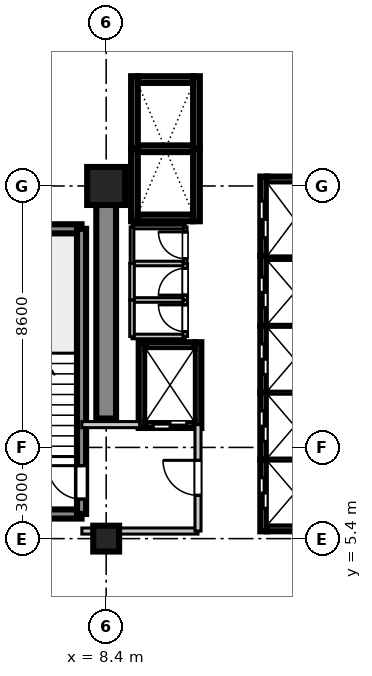
"""IFC4 building model, lengths in metres.
Left out: names, types, materials, properties, quantities, classifications, styles, units other than length and angle.
Written with IfcOpenShell. Run it as: python <this file> out.ifc"""

import sys

from ifc_helpers import new_model, si_unit, direction, frame, frame_2d, origin, origin_2d, place, context, subcontext, project, spatial, rectangle, extrude, source, transform, mapped, element, fill, save


model = new_model("IFC4")
c1 = context("Model", 3, precision=1e-05, world=origin(), true_north=direction((0.0, 1.0)))
c2 = subcontext(c1, "Body", "Model", "MODEL_VIEW")
j1 = project(units=[si_unit("LENGTHUNIT", "METRE"), si_unit("PLANEANGLEUNIT", "RADIAN")], contexts=[c1])
p1 = place(None, origin())
s1 = spatial("IfcSite", under=j1, at=p1, CompositionType="ELEMENT")
p2 = place(p1, origin())
s2 = spatial("IfcBuilding", under=s1, at=p2, CompositionType="ELEMENT")
p3 = place(p2, frame((0.0, 0.0, 132.1)))
s3 = spatial("IfcBuildingStorey", under=s2, at=p3, CompositionType="ELEMENT", Elevation=132.1)
m1 = source(origin(), c2, "Body", "SweptSolid", [
    extrude(rectangle(XDim=0.85, YDim=0.85, at=origin_2d()), origin(), (0.0, 0.0, 1.0), 3.605),
])
p4 = place(p3, frame((8.4, 5.4, 0.0), z_axis=(0.0, 0.0, 1.0), x_axis=(1.0, 0.0, 0.0)))
e1 = element("IfcColumn", 1, at=p4, inside=s3, PredefinedType="PILASTER", context=c2, shape_type="MappedRepresentation", body=[
    mapped(m1, transform((0.0, 0.0, 0.0), scale=1.0)),
])
m2 = source(origin(), c2, "Body", "SweptSolid", [
    extrude(rectangle(XDim=1.25, YDim=1.25, at=origin_2d()), origin(), (0.0, 0.0, 1.0), 3.605),
])
p5 = place(p3, frame((8.4, 17.0, 0.0), z_axis=(0.0, 0.0, 1.0), x_axis=(1.0, 0.0, 0.0)))
e2 = element("IfcColumn", 2, at=p5, inside=s3, PredefinedType="COLUMN", context=c2, shape_type="MappedRepresentation", body=[
    mapped(m2, transform((0.0, 0.0, 0.0), scale=1.0)),
])
m3 = source(origin(), c2, "Body", "SweptSolid", [
    extrude(rectangle(XDim=7.65, YDim=0.65, at=frame_2d((3.825, 0.0))), origin(), (0.0, 0.0, 1.0), 3.38),
])
p6 = place(p3, frame((8.4, 9.35, 0.0), z_axis=(0.0, 0.0, 1.0), x_axis=(0.0, 1.0, 0.0)))
e3 = element("IfcWall", 3, at=p6, inside=s3, PredefinedType="SHEAR", context=c2, shape_type="MappedRepresentation", body=[
    mapped(m3, transform((0.0, 0.0, 0.0), scale=1.0)),
])
m4 = source(origin(), c2, "Body", "SweptSolid", [
    extrude(rectangle(XDim=3.98, YDim=0.3, at=frame_2d((1.99, 0.0))), origin(), (0.0, 0.0, 1.0), 3.38),
])
for number, where, z_axis, x_axis in (
    (4, (3.61, 6.21, 0.0), (0.0, 0.0, 1.0), (1.0, 0.0, 0.0)),
    (5, (3.61, 15.59, 0.0), (0.0, 0.0, 1.0), (1.0, 0.0, 0.0)),
):
    element("IfcWall", number, at=place(p3, frame(where, z_axis=z_axis, x_axis=x_axis)), inside=s3, PredefinedType="SHEAR", context=c2, shape_type="MappedRepresentation", body=[
        mapped(m4, transform((0.0, 0.0, 0.0), scale=1.0)),
    ])
m5 = source(origin(), c2, "Body", "SweptSolid", [
    extrude(rectangle(XDim=9.38, YDim=0.3, at=frame_2d((4.69, 0.0))), origin(), (0.0, 0.0, 1.0), 3.38),
])
p7 = place(p3, frame((7.59, 6.21, 0.0), z_axis=(0.0, 0.0, 1.0), x_axis=(0.0, 1.0, 0.0)))
e6 = element("IfcWall", 6, at=p7, inside=s3, PredefinedType="SHEAR", context=c2, shape_type="MappedRepresentation", body=[
    mapped(m5, transform((0.0, 0.0, 0.0), scale=1.0)),
])
p8 = place(p7, frame((0.49, 0.0, 0.0)))
e7 = element("IfcOpeningElement", 7, at=p8, cuts=e6, PredefinedType="OPENING", context=c2, shape_type="SweptSolid", body=[
    extrude(rectangle(XDim=1.1, YDim=2.15, at=frame_2d((0.55, 1.075))), frame((0.0, 0.16, 0.0), z_axis=(0.0, -1.0, 0.0), x_axis=(1.0, 0.0, 0.0)), (0.0, 0.0, 1.0), 0.32),
])
m6 = source(origin(), c2, "Body", "SweptSolid", [
    extrude(rectangle(XDim=2.36, YDim=0.22, at=frame_2d((1.18, 0.0))), origin(), (0.0, 0.0, 1.0), 3.38),
])
p9 = place(p3, frame((13.58, 5.64, 0.0), z_axis=(0.0, 0.0, 1.0), x_axis=(0.0, 1.0, 0.0)))
e8 = element("IfcWall", 8, at=p9, inside=s3, PredefinedType="SHEAR", context=c2, shape_type="MappedRepresentation", body=[
    mapped(m6, transform((0.0, 0.0, 0.0), scale=1.0)),
])
p10 = place(p9, frame((0.76, 0.0, 0.0)))
e9 = element("IfcOpeningElement", 9, at=p10, cuts=e8, PredefinedType="OPENING", context=c2, shape_type="SweptSolid", body=[
    extrude(rectangle(XDim=1.0, YDim=2.2, at=frame_2d((0.5, 1.1))), frame((0.0, 0.12, 0.0), z_axis=(0.0, -1.0, 0.0), x_axis=(1.0, 0.0, 0.0)), (0.0, 0.0, 1.0), 0.24),
])
m7 = source(origin(), c2, "Body", "SweptSolid", [
    extrude(rectangle(XDim=1.82, YDim=0.22, at=frame_2d((0.91, 0.0))), origin(), (0.0, 0.0, 1.0), 3.38),
])
p11 = place(p3, frame((13.69, 5.75, 0.0), z_axis=(0.0, 0.0, 1.0), x_axis=(1.0, 0.0, 0.0)))
e10 = element("IfcWall", 10, at=p11, inside=s3, PredefinedType="SHEAR", context=c2, shape_type="MappedRepresentation", body=[
    mapped(m7, transform((0.0, 0.0, 0.0), scale=1.0)),
])
m8 = source(origin(), c2, "Body", "SweptSolid", [
    extrude(rectangle(XDim=1.82, YDim=0.22, at=frame_2d((0.91, 0.0))), origin(), (0.0, 0.0, 1.0), 3.65),
])
p12 = place(p3, frame((13.69, 8.0, 0.0), z_axis=(0.0, 0.0, 1.0), x_axis=(1.0, 0.0, 0.0)))
e11 = element("IfcWall", 11, at=p12, inside=s3, PredefinedType="SHEAR", context=c2, shape_type="MappedRepresentation", body=[
    mapped(m8, transform((0.0, 0.0, 0.0), scale=1.0)),
])
m9 = source(origin(), c2, "Body", "SweptSolid", [
    extrude(rectangle(XDim=2.2, YDim=0.22, at=frame_2d((1.1, 0.0))), origin(), (0.0, 0.0, 1.0), 3.38),
])
p13 = place(p3, frame((13.58, 8.0, 0.0), z_axis=(0.0, 0.0, 1.0), x_axis=(0.0, 1.0, 0.0)))
e12 = element("IfcWall", 12, at=p13, inside=s3, PredefinedType="SHEAR", context=c2, shape_type="MappedRepresentation", body=[
    mapped(m9, transform((0.0, 0.0, 0.0), scale=1.0)),
])
p14 = place(p13, frame((0.6, 0.0, 0.0)))
e13 = element("IfcOpeningElement", 13, at=p14, cuts=e12, PredefinedType="OPENING", context=c2, shape_type="SweptSolid", body=[
    extrude(rectangle(XDim=1.0, YDim=2.2, at=frame_2d((0.5, 1.1))), frame((0.0, 0.12, 0.0), z_axis=(0.0, -1.0, 0.0), x_axis=(1.0, 0.0, 0.0)), (0.0, 0.0, 1.0), 0.24),
])
p15 = place(p3, frame((13.69, 10.2, 0.0), z_axis=(0.0, 0.0, 1.0), x_axis=(1.0, 0.0, 0.0)))
e14 = element("IfcWall", 14, at=p15, inside=s3, PredefinedType="SHEAR", context=c2, shape_type="MappedRepresentation", body=[
    mapped(m8, transform((0.0, 0.0, 0.0), scale=1.0)),
])
p16 = place(p3, frame((13.58, 10.2, 0.0), z_axis=(0.0, 0.0, 1.0), x_axis=(0.0, 1.0, 0.0)))
e15 = element("IfcWall", 15, at=p16, inside=s3, PredefinedType="SHEAR", context=c2, shape_type="MappedRepresentation", body=[
    mapped(m9, transform((0.0, 0.0, 0.0), scale=1.0)),
])
p17 = place(p16, frame((0.6, 0.0, 0.0)))
e16 = element("IfcOpeningElement", 16, at=p17, cuts=e15, PredefinedType="OPENING", context=c2, shape_type="SweptSolid", body=[
    extrude(rectangle(XDim=1.0, YDim=2.2, at=frame_2d((0.5, 1.1))), frame((0.0, 0.12, 0.0), z_axis=(0.0, -1.0, 0.0), x_axis=(1.0, 0.0, 0.0)), (0.0, 0.0, 1.0), 0.24),
])
p18 = place(p3, frame((13.69, 12.4, 0.0), z_axis=(0.0, 0.0, 1.0), x_axis=(1.0, 0.0, 0.0)))
e17 = element("IfcWall", 17, at=p18, inside=s3, PredefinedType="SHEAR", context=c2, shape_type="MappedRepresentation", body=[
    mapped(m8, transform((0.0, 0.0, 0.0), scale=1.0)),
])
m10 = source(origin(), c2, "Body", "SweptSolid", [
    extrude(rectangle(XDim=2.3, YDim=0.22, at=frame_2d((1.15, 0.0))), origin(), (0.0, 0.0, 1.0), 3.38),
])
p19 = place(p3, frame((13.58, 12.4, 0.0), z_axis=(0.0, 0.0, 1.0), x_axis=(0.0, 1.0, 0.0)))
e18 = element("IfcWall", 18, at=p19, inside=s3, PredefinedType="SHEAR", context=c2, shape_type="MappedRepresentation", body=[
    mapped(m10, transform((0.0, 0.0, 0.0), scale=1.0)),
])
p20 = place(p19, frame((0.6, 0.0, 0.0)))
e19 = element("IfcOpeningElement", 19, at=p20, cuts=e18, PredefinedType="OPENING", context=c2, shape_type="SweptSolid", body=[
    extrude(rectangle(XDim=1.0, YDim=2.2, at=frame_2d((0.5, 1.1))), frame((0.0, 0.12, 0.0), z_axis=(0.0, -1.0, 0.0), x_axis=(1.0, 0.0, 0.0)), (0.0, 0.0, 1.0), 0.24),
])
p21 = place(p3, frame((13.69, 14.7, 0.0), z_axis=(0.0, 0.0, 1.0), x_axis=(1.0, 0.0, 0.0)))
e20 = element("IfcWall", 20, at=p21, inside=s3, PredefinedType="SHEAR", context=c2, shape_type="MappedRepresentation", body=[
    mapped(m8, transform((0.0, 0.0, 0.0), scale=1.0)),
])
m11 = source(origin(), c2, "Body", "SweptSolid", [
    extrude(rectangle(XDim=2.385, YDim=0.22, at=frame_2d((1.192, 0.0))), origin(), (0.0, 0.0, 1.0), 3.38),
])
for number, where, z_axis, x_axis in (
    (21, (9.33, 15.84, 0.0), (0.0, 0.0, 1.0), (0.0, 1.0, 0.0)),
    (22, (11.37, 15.84, 0.0), (0.0, 0.0, 1.0), (0.0, 1.0, 0.0)),
):
    element("IfcWall", number, at=place(p3, frame(where, z_axis=z_axis, x_axis=x_axis)), inside=s3, PredefinedType="SHEAR", context=c2, shape_type="MappedRepresentation", body=[
        mapped(m11, transform((0.0, 0.0, 0.0), scale=1.0)),
    ])
p22 = place(p3, frame((9.44, 15.95, 0.0), z_axis=(0.0, 0.0, 1.0), x_axis=(1.0, 0.0, 0.0)))
e23 = element("IfcWall", 23, at=p22, inside=s3, PredefinedType="SHEAR", context=c2, shape_type="MappedRepresentation", body=[
    mapped(m7, transform((0.0, 0.0, 0.0), scale=1.0)),
])
p23 = place(p3, frame((9.44, 18.225, 0.0), z_axis=(0.0, 0.0, 1.0), x_axis=(1.0, 0.0, 0.0)))
e24 = element("IfcWall", 24, at=p23, inside=s3, PredefinedType="SHEAR", context=c2, shape_type="MappedRepresentation", body=[
    mapped(m8, transform((0.0, 0.0, 0.0), scale=1.0)),
])
for number, where, z_axis, x_axis in (
    (25, (9.33, 18.225, 0.0), (0.0, 0.0, 1.0), (0.0, 1.0, 0.0)),
    (26, (11.37, 18.225, 0.0), (0.0, 0.0, 1.0), (0.0, 1.0, 0.0)),
):
    element("IfcWall", number, at=place(p3, frame(where, z_axis=z_axis, x_axis=x_axis)), inside=s3, PredefinedType="SHEAR", context=c2, shape_type="MappedRepresentation", body=[
        mapped(m11, transform((0.0, 0.0, 0.0), scale=1.0)),
    ])
p24 = place(p3, frame((9.44, 20.5, 0.0), z_axis=(0.0, 0.0, 1.0), x_axis=(1.0, 0.0, 0.0)))
e27 = element("IfcWall", 27, at=p24, inside=s3, PredefinedType="SHEAR", context=c2, shape_type="MappedRepresentation", body=[
    mapped(m7, transform((0.0, 0.0, 0.0), scale=1.0)),
])
m12 = source(origin(), c2, "Body", "SweptSolid", [
    extrude(rectangle(XDim=2.82, YDim=0.22, at=frame_2d((1.41, 0.0))), origin(), (0.0, 0.0, 1.0), 3.38),
])
for number, where, z_axis, x_axis in (
    (28, (9.58, 9.04, 0.0), (0.0, 0.0, 1.0), (0.0, 1.0, 0.0)),
    (29, (11.42, 9.04, 0.0), (0.0, 0.0, 1.0), (0.0, 1.0, 0.0)),
):
    element("IfcWall", number, at=place(p3, frame(where, z_axis=z_axis, x_axis=x_axis)), inside=s3, PredefinedType="SHEAR", context=c2, shape_type="MappedRepresentation", body=[
        mapped(m12, transform((0.0, 0.0, 0.0), scale=1.0)),
    ])
m13 = source(origin(), c2, "Body", "SweptSolid", [
    extrude(rectangle(XDim=1.62, YDim=0.22, at=frame_2d((0.81, 0.0))), origin(), (0.0, 0.0, 1.0), 3.38),
])
p25 = place(p3, frame((9.69, 9.15, 0.0), z_axis=(0.0, 0.0, 1.0), x_axis=(1.0, 0.0, 0.0)))
e30 = element("IfcWall", 30, at=p25, inside=s3, PredefinedType="SHEAR", context=c2, shape_type="MappedRepresentation", body=[
    mapped(m13, transform((0.0, 0.0, 0.0), scale=1.0)),
])
p26 = place(p25, frame((0.26, 0.0, 0.0)))
e31 = element("IfcOpeningElement", 31, at=p26, cuts=e30, PredefinedType="OPENING", context=c2, shape_type="SweptSolid", body=[
    extrude(rectangle(XDim=1.1, YDim=2.2, at=frame_2d((0.55, 1.1))), frame((0.0, 0.12, 0.0), z_axis=(0.0, -1.0, 0.0), x_axis=(1.0, 0.0, 0.0)), (0.0, 0.0, 1.0), 0.24),
])
p27 = place(p3, frame((9.69, 11.75, 0.0), z_axis=(0.0, 0.0, 1.0), x_axis=(1.0, 0.0, 0.0)))
e32 = element("IfcWall", 32, at=p27, inside=s3, PredefinedType="SHEAR", context=c2, shape_type="MappedRepresentation", body=[
    mapped(m13, transform((0.0, 0.0, 0.0), scale=1.0)),
])
m14 = source(origin(), c2, "Body", "SweptSolid", [
    extrude(rectangle(XDim=2.61, YDim=0.22, at=frame_2d((1.305, 0.0))), origin(), (0.0, 0.0, 1.0), 3.38),
])
p28 = place(p3, frame((13.58, 14.7, 0.0), z_axis=(0.0, 0.0, 1.0), x_axis=(0.0, 1.0, 0.0)))
e33 = element("IfcWall", 33, at=p28, inside=s3, PredefinedType="SHEAR", context=c2, shape_type="MappedRepresentation", body=[
    mapped(m14, transform((0.0, 0.0, 0.0), scale=1.0)),
])
p29 = place(p28, frame((0.6, 0.0, 0.0)))
e34 = element("IfcOpeningElement", 34, at=p29, cuts=e33, PredefinedType="OPENING", context=c2, shape_type="SweptSolid", body=[
    extrude(rectangle(XDim=1.2, YDim=2.2, at=frame_2d((0.6, 1.1))), frame((0.0, 0.12, 0.0), z_axis=(0.0, -1.0, 0.0), x_axis=(1.0, 0.0, 0.0)), (0.0, 0.0, 1.0), 0.24),
])
p30 = place(p3, frame((13.69, 17.2, 0.0), z_axis=(0.0, 0.0, 1.0), x_axis=(1.0, 0.0, 0.0)))
e35 = element("IfcWall", 35, at=p30, inside=s3, PredefinedType="SHEAR", context=c2, shape_type="MappedRepresentation", body=[
    mapped(m7, transform((0.0, 0.0, 0.0), scale=1.0)),
])
m15 = source(origin(), c2, "Body", "SweptSolid", [
    extrude(rectangle(XDim=3.82, YDim=0.2, at=frame_2d((1.91, 0.0))), origin(), (0.0, 0.0, 1.0), 2.72),
])
p31 = place(p3, frame((7.6, 5.65, 0.0), z_axis=(0.0, 0.0, 1.0), x_axis=(1.0, 0.0, 0.0)))
e36 = element("IfcWall", 36, at=p31, inside=s3, PredefinedType="PARTITIONING", context=c2, shape_type="MappedRepresentation", body=[
    mapped(m15, transform((0.0, 0.0, 0.0), scale=1.0)),
])
m16 = source(origin(), c2, "Body", "SweptSolid", [
    extrude(rectangle(XDim=1.9, YDim=0.2, at=frame_2d((0.95, 0.0))), origin(), (0.0, 0.0, 1.0), 2.72),
])
p32 = place(p3, frame((7.6, 9.15, 0.0), z_axis=(0.0, 0.0, 1.0), x_axis=(1.0, 0.0, 0.0)))
e37 = element("IfcWall", 37, at=p32, inside=s3, PredefinedType="PARTITIONING", context=c2, shape_type="MappedRepresentation", body=[
    mapped(m16, transform((0.0, 0.0, 0.0), scale=1.0)),
])
m17 = source(origin(), c2, "Body", "SweptSolid", [
    extrude(rectangle(XDim=3.5, YDim=0.2, at=frame_2d((1.75, 0.0))), origin(), (0.0, 0.0, 1.0), 2.72),
])
p33 = place(p3, frame((11.42, 5.65, 0.0), z_axis=(0.0, 0.0, 1.0), x_axis=(0.0, 1.0, 0.0)))
e38 = element("IfcWall", 38, at=p33, inside=s3, PredefinedType="PARTITIONING", context=c2, shape_type="MappedRepresentation", body=[
    mapped(m17, transform((0.0, 0.0, 0.0), scale=1.0)),
])
p34 = place(p33, frame((1.175, 0.0, 0.0)))
e39 = element("IfcOpeningElement", 39, at=p34, cuts=e38, PredefinedType="OPENING", context=c2, shape_type="SweptSolid", body=[
    extrude(rectangle(XDim=1.15, YDim=2.15, at=frame_2d((0.575, 1.075))), frame((0.0, 0.11, 0.0), z_axis=(0.0, -1.0, 0.0), x_axis=(1.0, 0.0, 0.0)), (0.0, 0.0, 1.0), 0.22),
])
m18 = source(origin(), c2, "Body", "SweptSolid", [
    extrude(rectangle(XDim=1.75, YDim=0.15, at=frame_2d((0.875, 0.0))), origin(), (0.0, 0.0, 1.0), 2.72),
])
for number, where, z_axis, x_axis in (
    (40, (9.25, 12.05, 0.0), (0.0, 0.0, 1.0), (1.0, 0.0, 0.0)),
    (41, (9.25, 13.25, 0.0), (0.0, 0.0, 1.0), (1.0, 0.0, 0.0)),
):
    element("IfcWall", number, at=place(p3, frame(where, z_axis=z_axis, x_axis=x_axis)), inside=s3, PredefinedType="PARTITIONING", context=c2, shape_type="MappedRepresentation", body=[
        mapped(m18, transform((0.0, 0.0, 0.0), scale=1.0)),
    ])
m19 = source(origin(), c2, "Body", "SweptSolid", [
    extrude(rectangle(XDim=1.2, YDim=0.15, at=frame_2d((0.6, 0.0))), origin(), (0.0, 0.0, 1.0), 2.72),
])
p35 = place(p3, frame((9.25, 12.05, 0.0), z_axis=(0.0, 0.0, 1.0), x_axis=(0.0, 1.0, 0.0)))
e42 = element("IfcWall", 42, at=p35, inside=s3, PredefinedType="PARTITIONING", context=c2, shape_type="MappedRepresentation", body=[
    mapped(m19, transform((0.0, 0.0, 0.0), scale=1.0)),
])
p36 = place(p3, frame((11.0, 12.05, 0.0), z_axis=(0.0, 0.0, 1.0), x_axis=(0.0, 1.0, 0.0)))
e43 = element("IfcWall", 43, at=p36, inside=s3, PredefinedType="PARTITIONING", context=c2, shape_type="MappedRepresentation", body=[
    mapped(m19, transform((0.0, 0.0, 0.0), scale=1.0)),
])
p37 = place(p36, frame((0.16, 0.0, 0.0)))
e44 = element("IfcOpeningElement", 44, at=p37, cuts=e43, PredefinedType="OPENING", context=c2, shape_type="SweptSolid", body=[
    extrude(rectangle(XDim=0.88, YDim=2.1, at=frame_2d((0.44, 1.05))), frame((0.0, 0.085, 0.0), z_axis=(0.0, -1.0, 0.0), x_axis=(1.0, 0.0, 0.0)), (0.0, 0.0, 1.0), 0.17),
])
p38 = place(p3, frame((9.25, 14.45, 0.0), z_axis=(0.0, 0.0, 1.0), x_axis=(1.0, 0.0, 0.0)))
e45 = element("IfcWall", 45, at=p38, inside=s3, PredefinedType="PARTITIONING", context=c2, shape_type="MappedRepresentation", body=[
    mapped(m18, transform((0.0, 0.0, 0.0), scale=1.0)),
])
p39 = place(p3, frame((9.25, 13.25, 0.0), z_axis=(0.0, 0.0, 1.0), x_axis=(0.0, 1.0, 0.0)))
e46 = element("IfcWall", 46, at=p39, inside=s3, PredefinedType="PARTITIONING", context=c2, shape_type="MappedRepresentation", body=[
    mapped(m19, transform((0.0, 0.0, 0.0), scale=1.0)),
])
p40 = place(p3, frame((11.0, 13.25, 0.0), z_axis=(0.0, 0.0, 1.0), x_axis=(0.0, 1.0, 0.0)))
e47 = element("IfcWall", 47, at=p40, inside=s3, PredefinedType="PARTITIONING", context=c2, shape_type="MappedRepresentation", body=[
    mapped(m19, transform((0.0, 0.0, 0.0), scale=1.0)),
])
p41 = place(p40, frame((0.16, 0.0, 0.0)))
e48 = element("IfcOpeningElement", 48, at=p41, cuts=e47, PredefinedType="OPENING", context=c2, shape_type="SweptSolid", body=[
    extrude(rectangle(XDim=0.88, YDim=2.1, at=frame_2d((0.44, 1.05))), frame((0.0, 0.085, 0.0), z_axis=(0.0, -1.0, 0.0), x_axis=(1.0, 0.0, 0.0)), (0.0, 0.0, 1.0), 0.17),
])
m20 = source(origin(), c2, "Body", "SweptSolid", [
    extrude(rectangle(XDim=1.75, YDim=0.12, at=frame_2d((0.875, 0.0))), origin(), (0.0, 0.0, 1.0), 2.72),
])
p42 = place(p3, frame((9.25, 15.65, 0.0), z_axis=(0.0, 0.0, 1.0), x_axis=(1.0, 0.0, 0.0)))
e49 = element("IfcWall", 49, at=p42, inside=s3, PredefinedType="PARTITIONING", context=c2, shape_type="MappedRepresentation", body=[
    mapped(m20, transform((0.0, 0.0, 0.0), scale=1.0)),
])
m21 = source(origin(), c2, "Body", "SweptSolid", [
    extrude(rectangle(XDim=1.2, YDim=0.12, at=frame_2d((0.6, 0.0))), origin(), (0.0, 0.0, 1.0), 2.72),
])
p43 = place(p3, frame((9.25, 14.45, 0.0), z_axis=(0.0, 0.0, 1.0), x_axis=(0.0, 1.0, 0.0)))
e50 = element("IfcWall", 50, at=p43, inside=s3, PredefinedType="PARTITIONING", context=c2, shape_type="MappedRepresentation", body=[
    mapped(m21, transform((0.0, 0.0, 0.0), scale=1.0)),
])
p44 = place(p3, frame((11.0, 14.45, 0.0), z_axis=(0.0, 0.0, 1.0), x_axis=(0.0, 1.0, 0.0)))
e51 = element("IfcWall", 51, at=p44, inside=s3, PredefinedType="PARTITIONING", context=c2, shape_type="MappedRepresentation", body=[
    mapped(m21, transform((0.0, 0.0, 0.0), scale=1.0)),
])
p45 = place(p44, frame((0.16, 0.0, 0.0)))
e52 = element("IfcOpeningElement", 52, at=p45, cuts=e51, PredefinedType="OPENING", context=c2, shape_type="SweptSolid", body=[
    extrude(rectangle(XDim=0.88, YDim=2.1, at=frame_2d((0.44, 1.05))), frame((0.0, 0.07, 0.0), z_axis=(0.0, -1.0, 0.0), x_axis=(1.0, 0.0, 0.0)), (0.0, 0.0, 1.0), 0.14),
])
m22 = source(origin(), c2, "Body", "SweptSolid", [
    extrude(rectangle(XDim=1.1, YDim=2.15, at=frame_2d((0.55, 1.075))), frame((0.0, 0.025, 0.0), z_axis=(0.0, -1.0, 0.0), x_axis=(1.0, 0.0, 0.0)), (0.0, 0.0, 1.0), 0.05),
])
p46 = place(p8, origin())
e53 = element("IfcDoor", 53, at=p46, inside=s3, OperationType="SINGLE_SWING_RIGHT", PredefinedType="DOOR", context=c2, shape_type="MappedRepresentation", body=[
    mapped(m22, transform((0.0, 0.0, 0.0), scale=1.0)),
])
fill(e7, e53)
m23 = source(origin(), c2, "Body", "SweptSolid", [
    extrude(rectangle(XDim=1.0, YDim=2.2, at=frame_2d((0.5, 1.1))), frame((0.0, 0.025, 0.0), z_axis=(0.0, -1.0, 0.0), x_axis=(1.0, 0.0, 0.0)), (0.0, 0.0, 1.0), 0.05),
])
p47 = place(p10, origin())
e54 = element("IfcDoor", 54, at=p47, inside=s3, OperationType="DOUBLE_DOOR_SLIDING", PredefinedType="DOOR", context=c2, shape_type="MappedRepresentation", body=[
    mapped(m23, transform((0.0, 0.0, 0.0), scale=1.0)),
])
fill(e9, e54)
p48 = place(p14, origin())
e55 = element("IfcDoor", 55, at=p48, inside=s3, OperationType="DOUBLE_DOOR_SLIDING", PredefinedType="DOOR", context=c2, shape_type="MappedRepresentation", body=[
    mapped(m23, transform((0.0, 0.0, 0.0), scale=1.0)),
])
fill(e13, e55)
p49 = place(p17, origin())
e56 = element("IfcDoor", 56, at=p49, inside=s3, OperationType="DOUBLE_DOOR_SLIDING", PredefinedType="DOOR", context=c2, shape_type="MappedRepresentation", body=[
    mapped(m23, transform((0.0, 0.0, 0.0), scale=1.0)),
])
fill(e16, e56)
p50 = place(p20, origin())
e57 = element("IfcDoor", 57, at=p50, inside=s3, OperationType="DOUBLE_DOOR_SLIDING", PredefinedType="DOOR", context=c2, shape_type="MappedRepresentation", body=[
    mapped(m23, transform((0.0, 0.0, 0.0), scale=1.0)),
])
fill(e19, e57)
m24 = source(origin(), c2, "Body", "SweptSolid", [
    extrude(rectangle(XDim=1.1, YDim=2.2, at=frame_2d((0.55, 1.1))), frame((0.0, 0.025, 0.0), z_axis=(0.0, -1.0, 0.0), x_axis=(1.0, 0.0, 0.0)), (0.0, 0.0, 1.0), 0.05),
])
p51 = place(p26, frame((1.1, 0.0, 0.0), z_axis=(0.0, 0.0, 1.0), x_axis=(-1.0, 0.0, 0.0)))
e58 = element("IfcDoor", 58, at=p51, inside=s3, OperationType="DOUBLE_DOOR_SLIDING", PredefinedType="DOOR", context=c2, shape_type="MappedRepresentation", body=[
    mapped(m24, transform((0.0, 0.0, 0.0), scale=1.0)),
])
fill(e31, e58)
m25 = source(origin(), c2, "Body", "SweptSolid", [
    extrude(rectangle(XDim=1.2, YDim=2.2, at=frame_2d((0.6, 1.1))), frame((0.0, 0.025, 0.0), z_axis=(0.0, -1.0, 0.0), x_axis=(1.0, 0.0, 0.0)), (0.0, 0.0, 1.0), 0.05),
])
p52 = place(p29, origin())
e59 = element("IfcDoor", 59, at=p52, inside=s3, OperationType="DOUBLE_DOOR_SLIDING", PredefinedType="DOOR", context=c2, shape_type="MappedRepresentation", body=[
    mapped(m25, transform((0.0, 0.0, 0.0), scale=1.0)),
])
fill(e34, e59)
m26 = source(origin(), c2, "Body", "SweptSolid", [
    extrude(rectangle(XDim=1.15, YDim=2.15, at=frame_2d((0.575, 1.075))), frame((0.0, 0.025, 0.0), z_axis=(0.0, -1.0, 0.0), x_axis=(1.0, 0.0, 0.0)), (0.0, 0.0, 1.0), 0.05),
])
p53 = place(p34, frame((1.15, 0.0, 0.0), z_axis=(0.0, 0.0, 1.0), x_axis=(-1.0, 0.0, 0.0)))
e60 = element("IfcDoor", 60, at=p53, inside=s3, OperationType="SINGLE_SWING_RIGHT", PredefinedType="DOOR", context=c2, shape_type="MappedRepresentation", body=[
    mapped(m26, transform((0.0, 0.0, 0.0), scale=1.0)),
])
fill(e39, e60)
m27 = source(origin(), c2, "Body", "SweptSolid", [
    extrude(rectangle(XDim=0.88, YDim=2.1, at=frame_2d((0.44, 1.05))), frame((0.0, 0.025, 0.0), z_axis=(0.0, -1.0, 0.0), x_axis=(1.0, 0.0, 0.0)), (0.0, 0.0, 1.0), 0.05),
])
p54 = place(p37, origin())
e61 = element("IfcDoor", 61, at=p54, inside=s3, OperationType="SINGLE_SWING_RIGHT", PredefinedType="DOOR", context=c2, shape_type="MappedRepresentation", body=[
    mapped(m27, transform((0.0, 0.0, 0.0), scale=1.0)),
])
fill(e44, e61)
p55 = place(p41, origin())
e62 = element("IfcDoor", 62, at=p55, inside=s3, OperationType="SINGLE_SWING_LEFT", PredefinedType="DOOR", context=c2, shape_type="MappedRepresentation", body=[
    mapped(m27, transform((0.0, 0.0, 0.0), scale=1.0)),
])
fill(e48, e62)
p56 = place(p45, origin())
e63 = element("IfcDoor", 63, at=p56, inside=s3, OperationType="SINGLE_SWING_RIGHT", PredefinedType="DOOR", context=c2, shape_type="MappedRepresentation", body=[
    mapped(m27, transform((0.0, 0.0, 0.0), scale=1.0)),
])
fill(e52, e63)
save(model, sys.argv[1])
